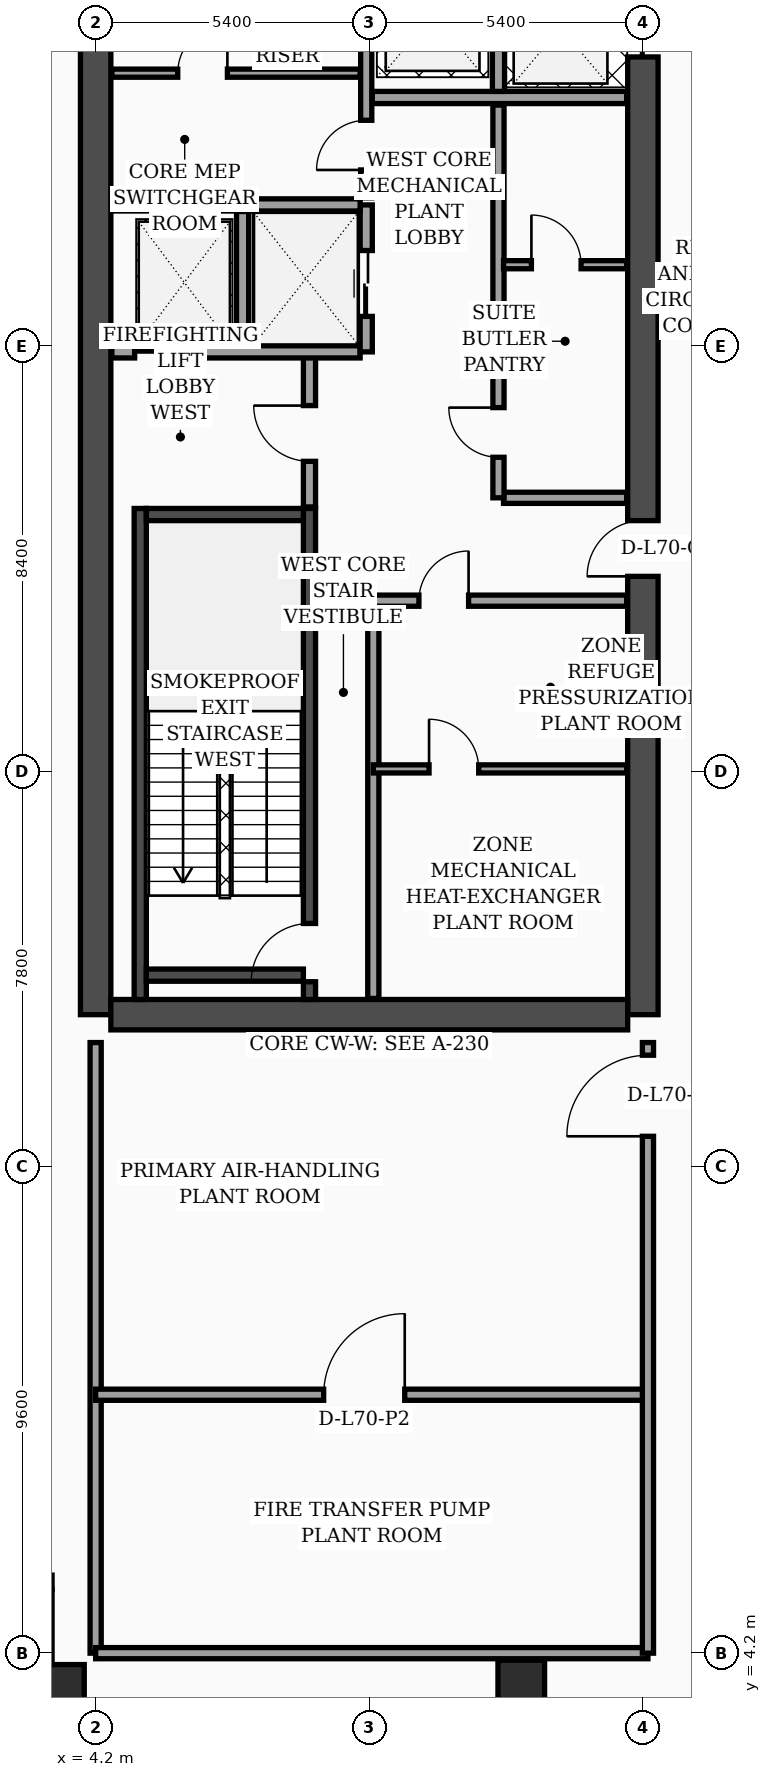
"""IFC4 building model, lengths in metres.
Left out: names, types, materials, properties, quantities, classifications, styles, units other than length and angle.
Written with IfcOpenShell. Run it as: python <this file> out.ifc"""

import sys

from ifc_helpers import new_model, si_unit, direction, frame, frame_2d, origin, origin_2d, place, context, subcontext, project, spatial, rectangle, hollow_rectangle, extrude, element, fill, save


model = new_model("IFC4")
c1 = context("Model", 3, precision=1e-05, world=origin(), true_north=direction((0.0, 1.0)))
c2 = subcontext(c1, "Body", "Model", "MODEL_VIEW")
j1 = project(units=[si_unit("LENGTHUNIT", "METRE"), si_unit("PLANEANGLEUNIT", "RADIAN")], contexts=[c1])
p1 = place(None, origin())
s1 = spatial("IfcSite", under=j1, at=p1, CompositionType="ELEMENT")
p2 = place(p1, origin())
s2 = spatial("IfcBuilding", under=s1, at=p2, CompositionType="ELEMENT")
p3 = place(p2, frame((0.0, 0.0, 282.5)))
s3 = spatial("IfcBuildingStorey", under=s2, at=p3, CompositionType="ELEMENT", Elevation=282.5)
p4 = place(p3, frame((4.2, 16.8, 0.0), z_axis=(0.0, 0.0, 1.0), x_axis=(0.0, 1.0, 0.0)))
e1 = element("IfcWall", 1, at=p4, inside=s3, PredefinedType="SHEAR", context=c2, shape_type="SweptSolid", body=[
    extrude(rectangle(XDim=21.6, YDim=0.6, at=frame_2d((10.8, 0.0))), origin(), (0.0, 0.0, 1.0), 4.35),
])
p5 = place(p3, frame((15.0, 16.8, 0.0), z_axis=(0.0, 0.0, 1.0), x_axis=(0.0, 1.0, 0.0)))
e2 = element("IfcWall", 2, at=p5, inside=s3, PredefinedType="SHEAR", context=c2, shape_type="SweptSolid", body=[
    extrude(rectangle(XDim=21.6, YDim=0.6, at=frame_2d((10.8, 0.0))), origin(), (0.0, 0.0, 1.0), 4.35),
])
p6 = place(p5, frame((8.65, 0.0, 0.0)))
e3 = element("IfcOpeningElement", 3, at=p6, cuts=e2, PredefinedType="OPENING", context=c2, shape_type="SweptSolid", body=[
    extrude(rectangle(XDim=1.1, YDim=2.2, at=frame_2d((0.55, 1.1))), frame((0.0, 0.31, 0.0), z_axis=(0.0, -1.0, 0.0), x_axis=(1.0, 0.0, 0.0)), (0.0, 0.0, 1.0), 0.62),
])
p7 = place(p5, frame((18.9, 0.0, 0.0)))
e4 = element("IfcOpeningElement", 4, at=p7, cuts=e2, PredefinedType="OPENING", context=c2, shape_type="SweptSolid", body=[
    extrude(rectangle(XDim=1.1, YDim=2.2, at=frame_2d((0.55, 1.1))), frame((0.0, 0.31, 0.0), z_axis=(0.0, -1.0, 0.0), x_axis=(1.0, 0.0, 0.0)), (0.0, 0.0, 1.0), 0.62),
])
p8 = place(p3, frame((4.5, 16.8, 0.0), z_axis=(0.0, 0.0, 1.0), x_axis=(1.0, 0.0, 0.0)))
e5 = element("IfcWall", 5, at=p8, inside=s3, PredefinedType="SHEAR", context=c2, shape_type="SweptSolid", body=[
    extrude(rectangle(XDim=10.2, YDim=0.6, at=frame_2d((5.1, 0.0))), origin(), (0.0, 0.0, 1.0), 4.35),
])
p9 = place(p3, frame((5.08, 17.1, 0.0), z_axis=(0.0, 0.0, 1.0), x_axis=(0.0, 1.0, 0.0)))
e6 = element("IfcWall", 6, at=p9, inside=s3, PredefinedType="SOLIDWALL", context=c2, shape_type="SweptSolid", body=[
    extrude(rectangle(XDim=9.69, YDim=0.24, at=frame_2d((4.845, 0.0))), origin(), (0.0, 0.0, 1.0), 4.35),
])
p10 = place(p3, frame((8.42, 17.1, 0.0), z_axis=(0.0, 0.0, 1.0), x_axis=(0.0, 1.0, 0.0)))
e7 = element("IfcWall", 7, at=p10, inside=s3, PredefinedType="SOLIDWALL", context=c2, shape_type="SweptSolid", body=[
    extrude(rectangle(XDim=9.69, YDim=0.24, at=frame_2d((4.845, 0.0))), origin(), (0.0, 0.0, 1.0), 4.35),
])
p11 = place(p10, frame((0.35, 0.0, 0.0)))
e8 = element("IfcOpeningElement", 8, at=p11, cuts=e7, PredefinedType="OPENING", context=c2, shape_type="SweptSolid", body=[
    extrude(rectangle(XDim=1.15, YDim=2.2, at=frame_2d((0.575, 1.1))), frame((0.0, 0.13, 0.0), z_axis=(0.0, -1.0, 0.0), x_axis=(1.0, 0.0, 0.0)), (0.0, 0.0, 1.0), 0.26),
])
for number, where, z_axis, x_axis in (
    (9, (5.2, 17.58, 0.0), (0.0, 0.0, 1.0), (1.0, 0.0, 0.0)),
    (10, (5.2, 26.67, 0.0), (0.0, 0.0, 1.0), (1.0, 0.0, 0.0)),
):
    element("IfcWall", number, at=place(p3, frame(where, z_axis=z_axis, x_axis=x_axis)), inside=s3, PredefinedType="SOLIDWALL", context=c2, shape_type="SweptSolid", body=[
        extrude(rectangle(XDim=3.1, YDim=0.24, at=frame_2d((1.55, 0.0))), origin(), (0.0, 0.0, 1.0), 4.35),
    ])
p12 = place(p3, frame((3.6, 3.6, 0.0), z_axis=(0.0, 0.0, 1.0), x_axis=(1.0, 0.0, 0.0)))
e11 = element("IfcColumn", 11, at=p12, inside=s3, PredefinedType="COLUMN", context=c2, shape_type="SweptSolid", body=[
    extrude(hollow_rectangle(XDim=0.75, YDim=0.75, WallThickness=0.032, at=origin_2d()), origin(), (0.0, 0.0, 1.0), 4.35),
])
p13 = place(p3, frame((12.6, 3.6, 0.0), z_axis=(0.0, 0.0, 1.0), x_axis=(1.0, 0.0, 0.0)))
e12 = element("IfcColumn", 12, at=p13, inside=s3, PredefinedType="COLUMN", context=c2, shape_type="SweptSolid", body=[
    extrude(rectangle(XDim=0.92, YDim=0.92, at=origin_2d()), origin(), (0.0, 0.0, 1.0), 4.35),
])
p14 = place(p3, frame((8.42, 26.82, 0.0), z_axis=(0.0, 0.0, 1.0), x_axis=(0.0, 1.0, 0.0)))
e13 = element("IfcWall", 13, at=p14, inside=s3, PredefinedType="SOLIDWALL", context=c2, shape_type="SweptSolid", body=[
    extrude(rectangle(XDim=3.0, YDim=0.24, at=frame_2d((1.5, 0.0))), origin(), (0.0, 0.0, 1.0), 4.35),
])
p15 = place(p14, frame((0.9, 0.0, 0.0)))
e14 = element("IfcOpeningElement", 14, at=p15, cuts=e13, PredefinedType="OPENING", context=c2, shape_type="SweptSolid", body=[
    extrude(rectangle(XDim=1.1, YDim=2.2, at=frame_2d((0.55, 1.1))), frame((0.0, 0.13, 0.0), z_axis=(0.0, -1.0, 0.0), x_axis=(1.0, 0.0, 0.0)), (0.0, 0.0, 1.0), 0.26),
])
p16 = place(p3, frame((4.52, 29.88, 0.0), z_axis=(0.0, 0.0, 1.0), x_axis=(1.0, 0.0, 0.0)))
e15 = element("IfcWall", 15, at=p16, inside=s3, PredefinedType="SOLIDWALL", context=c2, shape_type="SweptSolid", body=[
    extrude(rectangle(XDim=4.9, YDim=0.24, at=frame_2d((2.45, 0.0))), origin(), (0.0, 0.0, 1.0), 4.35),
])
p17 = place(p16, frame((0.45, 0.0, 0.0)))
e16 = element("IfcOpeningElement", 16, at=p17, cuts=e15, PredefinedType="OPENING", context=c2, shape_type="SweptSolid", body=[
    extrude(rectangle(XDim=1.3, YDim=2.35, at=frame_2d((0.65, 1.175))), frame((0.0, 0.13, 0.0), z_axis=(0.0, -1.0, 0.0), x_axis=(1.0, 0.0, 0.0)), (0.0, 0.0, 1.0), 0.26),
])
p18 = place(p3, frame((7.1, 30.02, 0.0), z_axis=(0.0, 0.0, 1.0), x_axis=(0.0, 1.0, 0.0)))
e17 = element("IfcWall", 17, at=p18, inside=s3, PredefinedType="SOLIDWALL", context=c2, shape_type="SweptSolid", body=[
    extrude(rectangle(XDim=2.63, YDim=0.24, at=frame_2d((1.315, 0.0))), origin(), (0.0, 0.0, 1.0), 4.35),
])
p19 = place(p3, frame((9.54, 29.88, 0.0), z_axis=(0.0, 0.0, 1.0), x_axis=(0.0, 1.0, 0.0)))
e18 = element("IfcWall", 18, at=p19, inside=s3, PredefinedType="SOLIDWALL", context=c2, shape_type="SweptSolid", body=[
    extrude(rectangle(XDim=2.9, YDim=0.24, at=frame_2d((1.45, 0.0))), origin(), (0.0, 0.0, 1.0), 4.35),
])
p20 = place(p19, frame((0.7, 0.0, 0.0)))
e19 = element("IfcOpeningElement", 19, at=p20, cuts=e18, PredefinedType="OPENING", context=c2, shape_type="SweptSolid", body=[
    extrude(rectangle(XDim=1.3, YDim=2.35, at=frame_2d((0.65, 1.175))), frame((0.0, 0.13, 0.0), z_axis=(0.0, -1.0, 0.0), x_axis=(1.0, 0.0, 0.0)), (0.0, 0.0, 1.0), 0.26),
])
p21 = place(p3, frame((4.52, 32.78, 0.0), z_axis=(0.0, 0.0, 1.0), x_axis=(1.0, 0.0, 0.0)))
e20 = element("IfcWall", 20, at=p21, inside=s3, PredefinedType="SOLIDWALL", context=c2, shape_type="SweptSolid", body=[
    extrude(rectangle(XDim=4.9, YDim=0.24, at=frame_2d((2.45, 0.0))), origin(), (0.0, 0.0, 1.0), 4.0),
])
p22 = place(p3, frame((9.68, 17.12, 0.0), z_axis=(0.0, 0.0, 1.0), x_axis=(0.0, 1.0, 0.0)))
e21 = element("IfcWall", 21, at=p22, inside=s3, PredefinedType="SOLIDWALL", context=c2, shape_type="SweptSolid", body=[
    extrude(rectangle(XDim=7.88, YDim=0.22, at=frame_2d((3.94, 0.0))), origin(), (0.0, 0.0, 1.0), 4.35),
])
p23 = place(p3, frame((4.52, 35.38, 0.0), z_axis=(0.0, 0.0, 1.0), x_axis=(1.0, 0.0, 0.0)))
e22 = element("IfcWall", 22, at=p23, inside=s3, PredefinedType="PARTITIONING", context=c2, shape_type="SweptSolid", body=[
    extrude(rectangle(XDim=4.9, YDim=0.16, at=frame_2d((2.45, 0.0))), origin(), (0.0, 0.0, 1.0), 4.35),
])
p24 = place(p23, frame((1.3, 0.0, 0.0)))
e23 = element("IfcOpeningElement", 23, at=p24, cuts=e22, PredefinedType="OPENING", context=c2, shape_type="SweptSolid", body=[
    extrude(rectangle(XDim=0.98, YDim=2.15, at=frame_2d((0.49, 1.075))), frame((0.0, 0.09, 0.0), z_axis=(0.0, -1.0, 0.0), x_axis=(1.0, 0.0, 0.0)), (0.0, 0.0, 1.0), 0.18),
])
p25 = place(p3, frame((9.54, 32.92, 0.0), z_axis=(0.0, 0.0, 1.0), x_axis=(0.0, 1.0, 0.0)))
e24 = element("IfcWall", 24, at=p25, inside=s3, PredefinedType="SOLIDWALL", context=c2, shape_type="SweptSolid", body=[
    extrude(rectangle(XDim=5.16, YDim=0.22, at=frame_2d((2.58, 0.0))), origin(), (0.0, 0.0, 1.0), 4.35),
])
p26 = place(p25, frame((0.55, 0.0, 0.0)))
e25 = element("IfcOpeningElement", 25, at=p26, cuts=e24, PredefinedType="OPENING", context=c2, shape_type="SweptSolid", body=[
    extrude(rectangle(XDim=0.98, YDim=2.15, at=frame_2d((0.49, 1.075))), frame((0.0, 0.12, 0.0), z_axis=(0.0, -1.0, 0.0), x_axis=(1.0, 0.0, 0.0)), (0.0, 0.0, 1.0), 0.24),
])
p27 = place(p3, frame((9.68, 21.65, 0.0), z_axis=(0.0, 0.0, 1.0), x_axis=(1.0, 0.0, 0.0)))
e26 = element("IfcWall", 26, at=p27, inside=s3, PredefinedType="PARTITIONING", context=c2, shape_type="SweptSolid", body=[
    extrude(rectangle(XDim=5.0, YDim=0.16, at=frame_2d((2.5, 0.0))), origin(), (0.0, 0.0, 1.0), 4.35),
])
p28 = place(p27, frame((1.1, 0.0, 0.0)))
e27 = element("IfcOpeningElement", 27, at=p28, cuts=e26, PredefinedType="OPENING", context=c2, shape_type="SweptSolid", body=[
    extrude(rectangle(XDim=0.98, YDim=2.15, at=frame_2d((0.49, 1.075))), frame((0.0, 0.09, 0.0), z_axis=(0.0, -1.0, 0.0), x_axis=(1.0, 0.0, 0.0)), (0.0, 0.0, 1.0), 0.18),
])
p29 = place(p3, frame((9.68, 24.97, 0.0), z_axis=(0.0, 0.0, 1.0), x_axis=(1.0, 0.0, 0.0)))
e28 = element("IfcWall", 28, at=p29, inside=s3, PredefinedType="SOLIDWALL", context=c2, shape_type="SweptSolid", body=[
    extrude(rectangle(XDim=5.0, YDim=0.22, at=frame_2d((2.5, 0.0))), origin(), (0.0, 0.0, 1.0), 3.8),
])
p30 = place(p29, frame((0.9, 0.0, 0.0)))
e29 = element("IfcOpeningElement", 29, at=p30, cuts=e28, PredefinedType="OPENING", context=c2, shape_type="SweptSolid", body=[
    extrude(rectangle(XDim=0.98, YDim=2.15, at=frame_2d((0.49, 1.075))), frame((0.0, 0.12, 0.0), z_axis=(0.0, -1.0, 0.0), x_axis=(1.0, 0.0, 0.0)), (0.0, 0.0, 1.0), 0.24),
])
p31 = place(p3, frame((12.25, 27.0, 0.0), z_axis=(0.0, 0.0, 1.0), x_axis=(1.0, 0.0, 0.0)))
e30 = element("IfcWall", 30, at=p31, inside=s3, PredefinedType="SOLIDWALL", context=c2, shape_type="SweptSolid", body=[
    extrude(rectangle(XDim=2.43, YDim=0.22, at=frame_2d((1.215, 0.0))), origin(), (0.0, 0.0, 1.0), 4.35),
])
p32 = place(p3, frame((12.15, 27.0, 0.0), z_axis=(0.0, 0.0, 1.0), x_axis=(0.0, 1.0, 0.0)))
e31 = element("IfcWall", 31, at=p32, inside=s3, PredefinedType="SOLIDWALL", context=c2, shape_type="SweptSolid", body=[
    extrude(rectangle(XDim=7.75, YDim=0.22, at=frame_2d((3.875, 0.0))), origin(), (0.0, 0.0, 1.0), 4.35),
])
p33 = place(p32, frame((0.8, 0.0, 0.0)))
e32 = element("IfcOpeningElement", 32, at=p33, cuts=e31, PredefinedType="OPENING", context=c2, shape_type="SweptSolid", body=[
    extrude(rectangle(XDim=0.98, YDim=2.15, at=frame_2d((0.49, 1.075))), frame((0.0, 0.12, 0.0), z_axis=(0.0, -1.0, 0.0), x_axis=(1.0, 0.0, 0.0)), (0.0, 0.0, 1.0), 0.24),
])
p34 = place(p3, frame((12.25, 31.6, 0.0), z_axis=(0.0, 0.0, 1.0), x_axis=(1.0, 0.0, 0.0)))
e33 = element("IfcWall", 33, at=p34, inside=s3, PredefinedType="PARTITIONING", context=c2, shape_type="SweptSolid", body=[
    extrude(rectangle(XDim=2.43, YDim=0.16, at=frame_2d((1.215, 0.0))), origin(), (0.0, 0.0, 1.0), 3.95),
])
p35 = place(p34, frame((0.55, 0.0, 0.0)))
e34 = element("IfcOpeningElement", 34, at=p35, cuts=e33, PredefinedType="OPENING", context=c2, shape_type="SweptSolid", body=[
    extrude(rectangle(XDim=0.98, YDim=2.15, at=frame_2d((0.49, 1.075))), frame((0.0, 0.09, 0.0), z_axis=(0.0, -1.0, 0.0), x_axis=(1.0, 0.0, 0.0)), (0.0, 0.0, 1.0), 0.18),
])
p36 = place(p3, frame((9.66, 34.9, 0.0), z_axis=(0.0, 0.0, 1.0), x_axis=(1.0, 0.0, 0.0)))
e35 = element("IfcWall", 35, at=p36, inside=s3, PredefinedType="SOLIDWALL", context=c2, shape_type="SweptSolid", body=[
    extrude(rectangle(XDim=5.02, YDim=0.24, at=frame_2d((2.51, 0.0))), origin(), (0.0, 0.0, 1.0), 4.35),
])
p37 = place(p3, frame((12.15, 35.02, 0.0), z_axis=(0.0, 0.0, 1.0), x_axis=(0.0, 1.0, 0.0)))
e36 = element("IfcWall", 36, at=p37, inside=s3, PredefinedType="SOLIDWALL", context=c2, shape_type="SweptSolid", body=[
    extrude(rectangle(XDim=3.06, YDim=0.24, at=frame_2d((1.53, 0.0))), origin(), (0.0, 0.0, 1.0), 4.35),
])
p38 = place(p3, frame((4.2, 4.2, 0.0), z_axis=(0.0, 0.0, 1.0), x_axis=(0.0, 1.0, 0.0)))
e37 = element("IfcWall", 37, at=p38, inside=s3, PredefinedType="SOLIDWALL", context=c2, shape_type="SweptSolid", body=[
    extrude(rectangle(XDim=12.05, YDim=0.22, at=frame_2d((6.025, 0.0))), origin(), (0.0, 0.0, 1.0), 3.8),
])
p39 = place(p3, frame((4.2, 4.2, 0.0), z_axis=(0.0, 0.0, 1.0), x_axis=(1.0, 0.0, 0.0)))
e38 = element("IfcWall", 38, at=p39, inside=s3, PredefinedType="SOLIDWALL", context=c2, shape_type="SweptSolid", body=[
    extrude(rectangle(XDim=10.9, YDim=0.22, at=frame_2d((5.45, 0.0))), origin(), (0.0, 0.0, 1.0), 3.8),
])
p40 = place(p3, frame((4.2, 9.3, 0.0), z_axis=(0.0, 0.0, 1.0), x_axis=(1.0, 0.0, 0.0)))
e39 = element("IfcWall", 39, at=p40, inside=s3, PredefinedType="SOLIDWALL", context=c2, shape_type="SweptSolid", body=[
    extrude(rectangle(XDim=10.9, YDim=0.22, at=frame_2d((5.45, 0.0))), origin(), (0.0, 0.0, 1.0), 3.8),
])
p41 = place(p40, frame((4.5, 0.0, 0.0)))
e40 = element("IfcOpeningElement", 40, at=p41, cuts=e39, PredefinedType="OPENING", context=c2, shape_type="SweptSolid", body=[
    extrude(rectangle(XDim=1.6, YDim=2.35, at=frame_2d((0.8, 1.175))), frame((0.0, 0.12, 0.0), z_axis=(0.0, -1.0, 0.0), x_axis=(1.0, 0.0, 0.0)), (0.0, 0.0, 1.0), 0.24),
])
p42 = place(p3, frame((15.1, 4.2, 0.0), z_axis=(0.0, 0.0, 1.0), x_axis=(0.0, 1.0, 0.0)))
e41 = element("IfcWall", 41, at=p42, inside=s3, PredefinedType="SOLIDWALL", context=c2, shape_type="SweptSolid", body=[
    extrude(rectangle(XDim=12.05, YDim=0.22, at=frame_2d((6.025, 0.0))), origin(), (0.0, 0.0, 1.0), 3.4),
])
p43 = place(p42, frame((10.2, 0.0, 0.0)))
e42 = element("IfcOpeningElement", 42, at=p43, cuts=e41, PredefinedType="OPENING", context=c2, shape_type="SweptSolid", body=[
    extrude(rectangle(XDim=1.6, YDim=2.35, at=frame_2d((0.8, 1.175))), frame((0.0, 0.12, 0.0), z_axis=(0.0, -1.0, 0.0), x_axis=(1.0, 0.0, 0.0)), (0.0, 0.0, 1.0), 0.24),
])
p44 = place(p15, origin())
e43 = element("IfcDoor", 43, at=p44, inside=s3, OperationType="SINGLE_SWING_RIGHT", PredefinedType="DOOR", context=c2, shape_type="SweptSolid", body=[
    extrude(rectangle(XDim=1.1, YDim=2.2, at=frame_2d((0.55, 1.1))), frame((0.0, 0.025, 0.0), z_axis=(0.0, -1.0, 0.0), x_axis=(1.0, 0.0, 0.0)), (0.0, 0.0, 1.0), 0.05),
])
fill(e14, e43)
p45 = place(p17, origin())
e44 = element("IfcDoor", 44, at=p45, inside=s3, OperationType="DOUBLE_DOOR_SLIDING", PredefinedType="DOOR", context=c2, shape_type="SweptSolid", body=[
    extrude(rectangle(XDim=1.3, YDim=2.35, at=frame_2d((0.65, 1.175))), frame((0.0, 0.025, 0.0), z_axis=(0.0, -1.0, 0.0), x_axis=(1.0, 0.0, 0.0)), (0.0, 0.0, 1.0), 0.05),
])
fill(e16, e44)
p46 = place(p20, origin())
e45 = element("IfcDoor", 45, at=p46, inside=s3, OperationType="DOUBLE_DOOR_SLIDING", PredefinedType="DOOR", context=c2, shape_type="SweptSolid", body=[
    extrude(rectangle(XDim=1.3, YDim=2.35, at=frame_2d((0.65, 1.175))), frame((0.0, 0.025, 0.0), z_axis=(0.0, -1.0, 0.0), x_axis=(1.0, 0.0, 0.0)), (0.0, 0.0, 1.0), 0.05),
])
fill(e19, e45)
p47 = place(p24, origin())
e46 = element("IfcDoor", 46, at=p47, inside=s3, OperationType="SINGLE_SWING_RIGHT", PredefinedType="DOOR", context=c2, shape_type="SweptSolid", body=[
    extrude(rectangle(XDim=0.98, YDim=2.15, at=frame_2d((0.49, 1.075))), frame((0.0, 0.025, 0.0), z_axis=(0.0, -1.0, 0.0), x_axis=(1.0, 0.0, 0.0)), (0.0, 0.0, 1.0), 0.05),
])
fill(e23, e46)
p48 = place(p26, origin())
e47 = element("IfcDoor", 47, at=p48, inside=s3, OperationType="SINGLE_SWING_LEFT", PredefinedType="DOOR", context=c2, shape_type="SweptSolid", body=[
    extrude(rectangle(XDim=0.98, YDim=2.15, at=frame_2d((0.49, 1.075))), frame((0.0, 0.025, 0.0), z_axis=(0.0, -1.0, 0.0), x_axis=(1.0, 0.0, 0.0)), (0.0, 0.0, 1.0), 0.05),
])
fill(e25, e47)
p49 = place(p28, origin())
e48 = element("IfcDoor", 48, at=p49, inside=s3, OperationType="SINGLE_SWING_LEFT", PredefinedType="DOOR", context=c2, shape_type="SweptSolid", body=[
    extrude(rectangle(XDim=0.98, YDim=2.15, at=frame_2d((0.49, 1.075))), frame((0.0, 0.025, 0.0), z_axis=(0.0, -1.0, 0.0), x_axis=(1.0, 0.0, 0.0)), (0.0, 0.0, 1.0), 0.05),
])
fill(e27, e48)
p50 = place(p30, origin())
e49 = element("IfcDoor", 49, at=p50, inside=s3, OperationType="SINGLE_SWING_RIGHT", PredefinedType="DOOR", context=c2, shape_type="SweptSolid", body=[
    extrude(rectangle(XDim=0.98, YDim=2.15, at=frame_2d((0.49, 1.075))), frame((0.0, 0.025, 0.0), z_axis=(0.0, -1.0, 0.0), x_axis=(1.0, 0.0, 0.0)), (0.0, 0.0, 1.0), 0.05),
])
fill(e29, e49)
p51 = place(p33, origin())
e50 = element("IfcDoor", 50, at=p51, inside=s3, OperationType="SINGLE_SWING_RIGHT", PredefinedType="DOOR", context=c2, shape_type="SweptSolid", body=[
    extrude(rectangle(XDim=0.98, YDim=2.15, at=frame_2d((0.49, 1.075))), frame((0.0, 0.025, 0.0), z_axis=(0.0, -1.0, 0.0), x_axis=(1.0, 0.0, 0.0)), (0.0, 0.0, 1.0), 0.05),
])
fill(e32, e50)
p52 = place(p35, origin())
e51 = element("IfcDoor", 51, at=p52, inside=s3, OperationType="SINGLE_SWING_LEFT", PredefinedType="DOOR", context=c2, shape_type="SweptSolid", body=[
    extrude(rectangle(XDim=0.98, YDim=2.15, at=frame_2d((0.49, 1.075))), frame((0.0, 0.025, 0.0), z_axis=(0.0, -1.0, 0.0), x_axis=(1.0, 0.0, 0.0)), (0.0, 0.0, 1.0), 0.05),
])
fill(e34, e51)
p53 = place(p41, origin())
e52 = element("IfcDoor", 52, at=p53, inside=s3, OperationType="SINGLE_SWING_RIGHT", PredefinedType="DOOR", context=c2, shape_type="SweptSolid", body=[
    extrude(rectangle(XDim=1.6, YDim=2.35, at=frame_2d((0.8, 1.175))), frame((0.0, 0.025, 0.0), z_axis=(0.0, -1.0, 0.0), x_axis=(1.0, 0.0, 0.0)), (0.0, 0.0, 1.0), 0.05),
])
fill(e40, e52)
p54 = place(p43, origin())
e53 = element("IfcDoor", 53, at=p54, inside=s3, OperationType="SINGLE_SWING_LEFT", PredefinedType="DOOR", context=c2, shape_type="SweptSolid", body=[
    extrude(rectangle(XDim=1.6, YDim=2.35, at=frame_2d((0.8, 1.175))), frame((0.0, 0.025, 0.0), z_axis=(0.0, -1.0, 0.0), x_axis=(1.0, 0.0, 0.0)), (0.0, 0.0, 1.0), 0.05),
])
fill(e42, e53)
p55 = place(p11, origin())
e54 = element("IfcDoor", 54, at=p55, inside=s3, OperationType="SINGLE_SWING_LEFT", PredefinedType="DOOR", context=c2, shape_type="SweptSolid", body=[
    extrude(rectangle(XDim=1.15, YDim=2.2, at=frame_2d((0.575, 1.1))), frame((0.0, 0.025, 0.0), z_axis=(0.0, -1.0, 0.0), x_axis=(1.0, 0.0, 0.0)), (0.0, 0.0, 1.0), 0.05),
])
fill(e8, e54)
p56 = place(p6, origin())
e55 = element("IfcDoor", 55, at=p56, inside=s3, OperationType="SINGLE_SWING_LEFT", PredefinedType="DOOR", context=c2, shape_type="SweptSolid", body=[
    extrude(rectangle(XDim=1.1, YDim=2.2, at=frame_2d((0.55, 1.1))), frame((0.0, 0.025, 0.0), z_axis=(0.0, -1.0, 0.0), x_axis=(1.0, 0.0, 0.0)), (0.0, 0.0, 1.0), 0.05),
])
fill(e3, e55)
p57 = place(p7, origin())
e56 = element("IfcDoor", 56, at=p57, inside=s3, OperationType="DOUBLE_DOOR_SLIDING", PredefinedType="DOOR", context=c2, shape_type="SweptSolid", body=[
    extrude(rectangle(XDim=1.1, YDim=2.2, at=frame_2d((0.55, 1.1))), frame((0.0, 0.025, 0.0), z_axis=(0.0, -1.0, 0.0), x_axis=(1.0, 0.0, 0.0)), (0.0, 0.0, 1.0), 0.05),
])
fill(e4, e56)
save(model, sys.argv[1])
